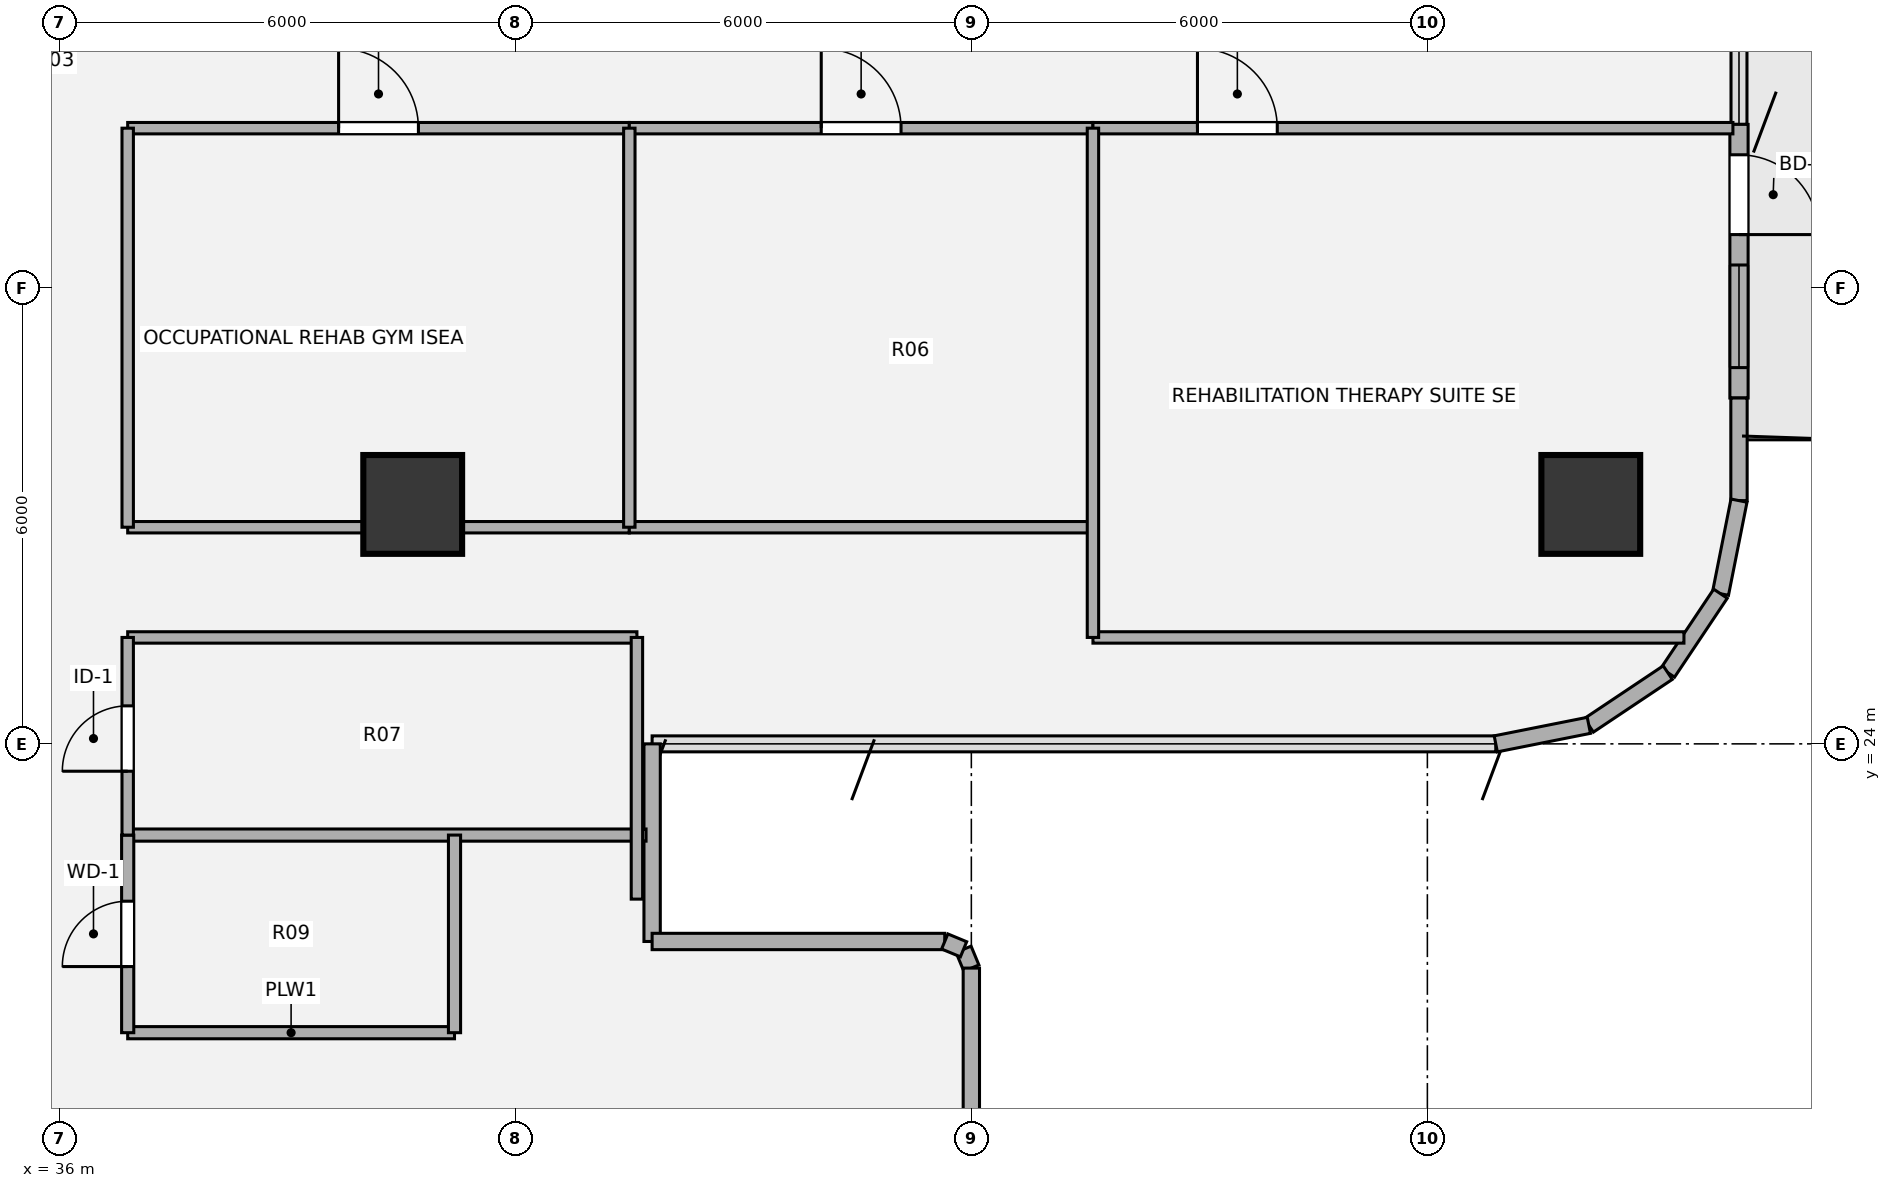
"""IFC4 building model, lengths in metres.
Left out: names, types, materials, properties, quantities, classifications, styles, units other than length and angle.
Written with IfcOpenShell. Run it as: python <this file> out.ifc"""

import sys

from ifc_helpers import new_model, si_unit, direction, frame, frame_2d, origin, origin_2d, place, context, subcontext, project, spatial, rectangle, hollow_circle, extrude, source, transform, mapped, element, fill, save


model = new_model("IFC4")
c1 = context("Model", 3, precision=1e-05, world=origin(), true_north=direction((0.0, 1.0)))
c2 = subcontext(c1, "Body", "Model", "MODEL_VIEW")
j1 = project(units=[si_unit("LENGTHUNIT", "METRE"), si_unit("PLANEANGLEUNIT", "RADIAN")], contexts=[c1])
p1 = place(None, origin())
s1 = spatial("IfcSite", under=j1, at=p1, CompositionType="ELEMENT")
p2 = place(p1, origin())
s2 = spatial("IfcBuilding", under=s1, at=p2, CompositionType="ELEMENT")
p3 = place(p2, frame((0.0, 0.0, 112.5)))
s3 = spatial("IfcBuildingStorey", under=s2, at=p3, CompositionType="ELEMENT", Elevation=112.5)
m1 = source(origin(), c2, "Body", "SweptSolid", [
    extrude(hollow_circle(Radius=0.65, WallThickness=0.045, at=origin_2d()), origin(), (0.0, 0.0, 1.0), 3.78),
])
for number, where, z_axis, x_axis in (
    (1, (56.15, 27.15, 0.0), (0.0, 0.0, 1.0), (1.0, 0.0, 0.0)),
    (2, (40.65, 27.15, 0.0), (0.0, 0.0, 1.0), (1.0, 0.0, 0.0)),
):
    element("IfcColumn", number, at=place(p3, frame(where, z_axis=z_axis, x_axis=x_axis)), inside=s3, PredefinedType="COLUMN", context=c2, shape_type="MappedRepresentation", body=[
        mapped(m1, transform((0.0, 0.0, 0.0), x_axis=(1.0, 0.0, 0.0), y_axis=(0.0, 1.0, 0.0), z_axis=(0.0, 0.0, 1.0), scale=1.0)),
    ])
p4 = place(p3, frame((47.897, 21.298, 0.0), z_axis=(0.0, 0.0, 1.0), x_axis=(0.382673670509, -0.923883575944, 0.0)))
e3 = element("IfcWall", 3, at=p4, inside=s3, PredefinedType="SOLIDWALL", context=c2, shape_type="SweptSolid", body=[
    extrude(rectangle(XDim=0.268, YDim=0.215, at=frame_2d((0.134, 0.0))), origin(), (0.0, 0.0, 1.0), 3.53),
])
p5 = place(p3, frame((48.0, 21.05, 0.0), z_axis=(0.0, 0.0, 1.0), x_axis=(0.0, -1.0, 0.0)))
e4 = element("IfcWall", 4, at=p5, inside=s3, PredefinedType="SOLIDWALL", context=c2, shape_type="SweptSolid", body=[
    extrude(rectangle(XDim=2.62, YDim=0.215, at=frame_2d((1.31, 0.0))), origin(), (0.0, 0.0, 1.0), 3.53),
])
p6 = place(p3, frame((58.1, 32.15, 0.0), z_axis=(0.0, 0.0, 1.0), x_axis=(0.0, -1.0, 0.0)))
e5 = element("IfcWall", 5, at=p6, inside=s3, PredefinedType="SOLIDWALL", context=c2, shape_type="SweptSolid", body=[
    extrude(rectangle(XDim=3.6, YDim=0.24, at=frame_2d((1.8, 0.0))), origin(), (0.0, 0.0, 1.0), 3.53),
])
p7 = place(p6, frame((0.4, 0.0, 0.0)))
e6 = element("IfcOpeningElement", 6, at=p7, cuts=e5, PredefinedType="OPENING", context=c2, shape_type="SweptSolid", body=[
    extrude(rectangle(XDim=1.05, YDim=2.15, at=origin_2d()), frame((0.525, 0.13, 1.075), z_axis=(0.0, -1.0, 0.0), x_axis=(1.0, 0.0, 0.0)), (0.0, 0.0, 1.0), 0.26),
])
p8 = place(p6, frame((1.85, 0.0, 0.85)))
e7 = element("IfcOpeningElement", 7, at=p8, cuts=e5, PredefinedType="OPENING", context=c2, shape_type="SweptSolid", body=[
    extrude(rectangle(XDim=1.35, YDim=1.35, at=origin_2d()), frame((0.675, 0.13, 0.675), z_axis=(0.0, -1.0, 0.0), x_axis=(1.0, 0.0, 0.0)), (0.0, 0.0, 1.0), 0.26),
])
p9 = place(p3, frame((58.1, 28.55, 0.0), z_axis=(0.0, 0.0, 1.0), x_axis=(0.0, -1.0, 0.0)))
e8 = element("IfcWall", 8, at=p9, inside=s3, PredefinedType="SOLIDWALL", context=c2, shape_type="SweptSolid", body=[
    extrude(rectangle(XDim=1.35, YDim=0.215, at=frame_2d((0.675, 0.0))), origin(), (0.0, 0.0, 1.0), 3.53),
])
for number, where, z_axis, x_axis in (
    (9, (58.1, 27.2, 0.0), (0.0, 0.0, 1.0), (-0.195, -0.981, 0.0)),
    (10, (57.856, 25.975, 0.0), (0.0, 0.0, 1.0), (-0.556, -0.831, 0.0)),
    (11, (57.163, 24.937, 0.0), (0.0, 0.0, 1.0), (-0.831, -0.556, 0.0)),
    (12, (56.125, 24.244, 0.0), (0.0, 0.0, 1.0), (-0.981, -0.195, 0.0)),
):
    element("IfcWall", number, at=place(p3, frame(where, z_axis=z_axis, x_axis=x_axis)), inside=s3, PredefinedType="SOLIDWALL", context=c2, shape_type="SweptSolid", body=[
        extrude(rectangle(XDim=1.249, YDim=0.215, at=frame_2d((0.624, 0.0))), origin(), (0.0, 0.0, 1.0), 3.53),
    ])
p10 = place(p3, frame((43.8, 24.0, 0.0), z_axis=(0.0, 0.0, 1.0), x_axis=(0.0, -1.0, 0.0)))
e13 = element("IfcWall", 13, at=p10, inside=s3, PredefinedType="SOLIDWALL", context=c2, shape_type="SweptSolid", body=[
    extrude(rectangle(XDim=2.6, YDim=0.215, at=frame_2d((1.3, 0.0))), origin(), (0.0, 0.0, 1.0), 3.53),
])
p11 = place(p3, frame((43.8, 21.4, 0.0), z_axis=(0.0, 0.0, 1.0), x_axis=(1.0, 0.0, 0.0)))
e14 = element("IfcWall", 14, at=p11, inside=s3, PredefinedType="SOLIDWALL", context=c2, shape_type="SweptSolid", body=[
    extrude(rectangle(XDim=3.85, YDim=0.215, at=frame_2d((1.925, 0.0))), origin(), (0.0, 0.0, 1.0), 3.53),
])
p12 = place(p3, frame((47.65, 21.4, 0.0), z_axis=(0.0, 0.0, 1.0), x_axis=(0.924205486139, -0.381895560841, 0.0)))
e15 = element("IfcWall", 15, at=p12, inside=s3, PredefinedType="SOLIDWALL", context=c2, shape_type="SweptSolid", body=[
    extrude(rectangle(XDim=0.268, YDim=0.215, at=frame_2d((0.134, 0.0))), origin(), (0.0, 0.0, 1.0), 3.53),
])
p13 = place(p3, frame((36.9, 20.2, 0.0), z_axis=(0.0, 0.0, 1.0), x_axis=(1.0, 0.0, 0.0)))
e16 = element("IfcWall", 16, at=p13, inside=s3, PredefinedType="PLUMBINGWALL", context=c2, shape_type="SweptSolid", body=[
    extrude(rectangle(XDim=4.3, YDim=0.16, at=frame_2d((2.15, 0.0))), origin(), (0.0, 0.0, 1.0), 3.5),
])
p14 = place(p3, frame((36.9, 22.8, 0.0), z_axis=(0.0, 0.0, 1.0), x_axis=(1.0, 0.0, 0.0)))
e17 = element("IfcWall", 17, at=p14, inside=s3, PredefinedType="PLUMBINGWALL", context=c2, shape_type="SweptSolid", body=[
    extrude(rectangle(XDim=6.82, YDim=0.16, at=frame_2d((3.41, 0.0))), origin(), (0.0, 0.0, 1.0), 3.5),
])
p15 = place(p3, frame((36.9, 25.4, 0.0), z_axis=(0.0, 0.0, 1.0), x_axis=(1.0, 0.0, 0.0)))
e18 = element("IfcWall", 18, at=p15, inside=s3, PredefinedType="PARTITIONING", context=c2, shape_type="SweptSolid", body=[
    extrude(rectangle(XDim=6.7, YDim=0.15, at=frame_2d((3.35, 0.0))), origin(), (0.0, 0.0, 1.0), 3.5),
])
p16 = place(p3, frame((49.6, 25.4, 0.0), z_axis=(0.0, 0.0, 1.0), x_axis=(1.0, 0.0, 0.0)))
e19 = element("IfcWall", 19, at=p16, inside=s3, PredefinedType="PARTITIONING", context=c2, shape_type="SweptSolid", body=[
    extrude(rectangle(XDim=7.776, YDim=0.15, at=frame_2d((3.888, 0.0))), origin(), (0.0, 0.0, 1.0), 3.5),
])
p17 = place(p3, frame((36.9, 26.85, 0.0), z_axis=(0.0, 0.0, 1.0), x_axis=(1.0, 0.0, 0.0)))
e20 = element("IfcWall", 20, at=p17, inside=s3, PredefinedType="PARTITIONING", context=c2, shape_type="SweptSolid", body=[
    extrude(rectangle(XDim=6.6, YDim=0.15, at=frame_2d((3.3, 0.0))), origin(), (0.0, 0.0, 1.0), 2.903),
])
p18 = place(p3, frame((43.5, 26.85, 0.0), z_axis=(0.0, 0.0, 1.0), x_axis=(1.0, 0.0, 0.0)))
e21 = element("IfcWall", 21, at=p18, inside=s3, PredefinedType="PARTITIONING", context=c2, shape_type="SweptSolid", body=[
    extrude(rectangle(XDim=6.1, YDim=0.15, at=frame_2d((3.05, 0.0))), origin(), (0.0, 0.0, 1.0), 3.055),
])
p19 = place(p3, frame((36.9, 32.1, 0.0), z_axis=(0.0, 0.0, 1.0), x_axis=(1.0, 0.0, 0.0)))
e22 = element("IfcWall", 22, at=p19, inside=s3, PredefinedType="PARTITIONING", context=c2, shape_type="SweptSolid", body=[
    extrude(rectangle(XDim=6.6, YDim=0.15, at=frame_2d((3.3, 0.0))), origin(), (0.0, 0.0, 1.0), 2.982),
])
p20 = place(p19, frame((2.775, 0.0, 0.0)))
e23 = element("IfcOpeningElement", 23, at=p20, cuts=e22, PredefinedType="OPENING", context=c2, shape_type="SweptSolid", body=[
    extrude(rectangle(XDim=1.05, YDim=2.1, at=origin_2d()), frame((0.525, 0.085, 1.05), z_axis=(0.0, -1.0, 0.0), x_axis=(1.0, 0.0, 0.0)), (0.0, 0.0, 1.0), 0.17),
])
p21 = place(p3, frame((43.5, 32.1, 0.0), z_axis=(0.0, 0.0, 1.0), x_axis=(1.0, 0.0, 0.0)))
e24 = element("IfcWall", 24, at=p21, inside=s3, PredefinedType="PARTITIONING", context=c2, shape_type="SweptSolid", body=[
    extrude(rectangle(XDim=6.1, YDim=0.15, at=frame_2d((3.05, 0.0))), origin(), (0.0, 0.0, 1.0), 2.982),
])
p22 = place(p21, frame((2.525, 0.0, 0.0)))
e25 = element("IfcOpeningElement", 25, at=p22, cuts=e24, PredefinedType="OPENING", context=c2, shape_type="SweptSolid", body=[
    extrude(rectangle(XDim=1.05, YDim=2.1, at=origin_2d()), frame((0.525, 0.085, 1.05), z_axis=(0.0, -1.0, 0.0), x_axis=(1.0, 0.0, 0.0)), (0.0, 0.0, 1.0), 0.17),
])
p23 = place(p3, frame((49.6, 32.1, 0.0), z_axis=(0.0, 0.0, 1.0), x_axis=(1.0, 0.0, 0.0)))
e26 = element("IfcWall", 26, at=p23, inside=s3, PredefinedType="PARTITIONING", context=c2, shape_type="SweptSolid", body=[
    extrude(rectangle(XDim=8.42, YDim=0.15, at=frame_2d((4.21, 0.0))), origin(), (0.0, 0.0, 1.0), 2.982),
])
p24 = place(p23, frame((1.375, 0.0, 0.0)))
e27 = element("IfcOpeningElement", 27, at=p24, cuts=e26, PredefinedType="OPENING", context=c2, shape_type="SweptSolid", body=[
    extrude(rectangle(XDim=1.05, YDim=2.1, at=origin_2d()), frame((0.525, 0.085, 1.05), z_axis=(0.0, -1.0, 0.0), x_axis=(1.0, 0.0, 0.0)), (0.0, 0.0, 1.0), 0.17),
])
p25 = place(p3, frame((36.9, 20.2, 0.0), z_axis=(0.0, 0.0, 1.0), x_axis=(0.0, 1.0, 0.0)))
e28 = element("IfcWall", 28, at=p25, inside=s3, PredefinedType="PLUMBINGWALL", context=c2, shape_type="SweptSolid", body=[
    extrude(rectangle(XDim=2.6, YDim=0.16, at=frame_2d((1.3, 0.0))), origin(), (0.0, 0.0, 1.0), 3.5),
])
p26 = place(p25, frame((0.87, 0.0, 0.0)))
e29 = element("IfcOpeningElement", 29, at=p26, cuts=e28, PredefinedType="OPENING", context=c2, shape_type="SweptSolid", body=[
    extrude(rectangle(XDim=0.86, YDim=2.1, at=origin_2d()), frame((0.43, 0.09, 1.05), z_axis=(0.0, -1.0, 0.0), x_axis=(1.0, 0.0, 0.0)), (0.0, 0.0, 1.0), 0.18),
])
p27 = place(p3, frame((36.9, 22.8, 0.0), z_axis=(0.0, 0.0, 1.0), x_axis=(0.0, 1.0, 0.0)))
e30 = element("IfcWall", 30, at=p27, inside=s3, PredefinedType="PARTITIONING", context=c2, shape_type="SweptSolid", body=[
    extrude(rectangle(XDim=2.6, YDim=0.15, at=frame_2d((1.3, 0.0))), origin(), (0.0, 0.0, 1.0), 3.5),
])
p28 = place(p27, frame((0.84, 0.0, 0.0)))
e31 = element("IfcOpeningElement", 31, at=p28, cuts=e30, PredefinedType="OPENING", context=c2, shape_type="SweptSolid", body=[
    extrude(rectangle(XDim=0.86, YDim=2.1, at=origin_2d()), frame((0.43, 0.085, 1.05), z_axis=(0.0, -1.0, 0.0), x_axis=(1.0, 0.0, 0.0)), (0.0, 0.0, 1.0), 0.17),
])
p29 = place(p3, frame((36.9, 26.85, 0.0), z_axis=(0.0, 0.0, 1.0), x_axis=(0.0, 1.0, 0.0)))
e32 = element("IfcWall", 32, at=p29, inside=s3, PredefinedType="PARTITIONING", context=c2, shape_type="SweptSolid", body=[
    extrude(rectangle(XDim=5.25, YDim=0.15, at=frame_2d((2.625, 0.0))), origin(), (0.0, 0.0, 1.0), 3.5),
])
p30 = place(p3, frame((41.2, 20.2, 0.0), z_axis=(0.0, 0.0, 1.0), x_axis=(0.0, 1.0, 0.0)))
e33 = element("IfcWall", 33, at=p30, inside=s3, PredefinedType="PLUMBINGWALL", context=c2, shape_type="SweptSolid", body=[
    extrude(rectangle(XDim=2.6, YDim=0.16, at=frame_2d((1.3, 0.0))), origin(), (0.0, 0.0, 1.0), 2.815),
])
p31 = place(p3, frame((43.5, 26.85, 0.0), z_axis=(0.0, 0.0, 1.0), x_axis=(0.0, 1.0, 0.0)))
e34 = element("IfcWall", 34, at=p31, inside=s3, PredefinedType="PARTITIONING", context=c2, shape_type="SweptSolid", body=[
    extrude(rectangle(XDim=5.25, YDim=0.15, at=frame_2d((2.625, 0.0))), origin(), (0.0, 0.0, 1.0), 3.5),
])
p32 = place(p3, frame((43.6, 21.958, 0.0), z_axis=(0.0, 0.0, 1.0), x_axis=(0.0, 1.0, 0.0)))
e35 = element("IfcWall", 35, at=p32, inside=s3, PredefinedType="PARTITIONING", context=c2, shape_type="SweptSolid", body=[
    extrude(rectangle(XDim=3.442, YDim=0.15, at=frame_2d((1.721, 0.0))), origin(), (0.0, 0.0, 1.0), 3.5),
])
p33 = place(p3, frame((49.6, 25.4, 0.0), z_axis=(0.0, 0.0, 1.0), x_axis=(0.0, 1.0, 0.0)))
e36 = element("IfcWall", 36, at=p33, inside=s3, PredefinedType="PARTITIONING", context=c2, shape_type="SweptSolid", body=[
    extrude(rectangle(XDim=6.7, YDim=0.15, at=frame_2d((3.35, 0.0))), origin(), (0.0, 0.0, 1.0), 3.5),
])
m2 = source(origin(), c2, "Body", "SweptSolid", [
    extrude(rectangle(XDim=1.05, YDim=2.15, at=origin_2d()), frame((0.525, 0.025, 1.075), z_axis=(0.0, -1.0, 0.0), x_axis=(1.0, 0.0, 0.0)), (0.0, 0.0, 1.0), 0.05),
])
p34 = place(p7, origin())
e37 = element("IfcDoor", 37, at=p34, inside=s3, OperationType="SINGLE_SWING_RIGHT", PredefinedType="DOOR", context=c2, shape_type="MappedRepresentation", body=[
    mapped(m2, transform((0.0, 0.0, 0.0), x_axis=(1.0, 0.0, 0.0), y_axis=(0.0, 1.0, 0.0), z_axis=(0.0, 0.0, 1.0), scale=1.0)),
])
fill(e6, e37)
m3 = source(origin(), c2, "Body", "SweptSolid", [
    extrude(rectangle(XDim=1.35, YDim=1.35, at=origin_2d()), frame((0.675, 0.03, 0.675), z_axis=(0.0, -1.0, 0.0), x_axis=(1.0, 0.0, 0.0)), (0.0, 0.0, 1.0), 0.06),
])
p35 = place(p8, origin())
e38 = element("IfcWindow", 38, at=p35, inside=s3, PartitioningType="SINGLE_PANEL", PredefinedType="WINDOW", context=c2, shape_type="MappedRepresentation", body=[
    mapped(m3, transform((0.0, 0.0, 0.0), x_axis=(1.0, 0.0, 0.0), y_axis=(0.0, 1.0, 0.0), z_axis=(0.0, 0.0, 1.0), scale=1.0)),
])
fill(e7, e38)
m4 = source(origin(), c2, "Body", "SweptSolid", [
    extrude(rectangle(XDim=1.05, YDim=2.1, at=origin_2d()), frame((0.525, 0.025, 1.05), z_axis=(0.0, -1.0, 0.0), x_axis=(1.0, 0.0, 0.0)), (0.0, 0.0, 1.0), 0.05),
])
p36 = place(p20, origin())
e39 = element("IfcDoor", 39, at=p36, inside=s3, OperationType="SINGLE_SWING_LEFT", PredefinedType="DOOR", context=c2, shape_type="MappedRepresentation", body=[
    mapped(m4, transform((0.0, 0.0, 0.0), x_axis=(1.0, 0.0, 0.0), y_axis=(0.0, 1.0, 0.0), z_axis=(0.0, 0.0, 1.0), scale=1.0)),
])
fill(e23, e39)
p37 = place(p22, origin())
e40 = element("IfcDoor", 40, at=p37, inside=s3, OperationType="SINGLE_SWING_LEFT", PredefinedType="DOOR", context=c2, shape_type="MappedRepresentation", body=[
    mapped(m4, transform((0.0, 0.0, 0.0), x_axis=(1.0, 0.0, 0.0), y_axis=(0.0, 1.0, 0.0), z_axis=(0.0, 0.0, 1.0), scale=1.0)),
])
fill(e25, e40)
p38 = place(p24, origin())
e41 = element("IfcDoor", 41, at=p38, inside=s3, OperationType="SINGLE_SWING_LEFT", PredefinedType="DOOR", context=c2, shape_type="MappedRepresentation", body=[
    mapped(m4, transform((0.0, 0.0, 0.0), x_axis=(1.0, 0.0, 0.0), y_axis=(0.0, 1.0, 0.0), z_axis=(0.0, 0.0, 1.0), scale=1.0)),
])
fill(e27, e41)
m5 = source(origin(), c2, "Body", "SweptSolid", [
    extrude(rectangle(XDim=0.86, YDim=2.1, at=origin_2d()), frame((0.43, 0.025, 1.05), z_axis=(0.0, -1.0, 0.0), x_axis=(1.0, 0.0, 0.0)), (0.0, 0.0, 1.0), 0.05),
])
p39 = place(p26, origin())
e42 = element("IfcDoor", 42, at=p39, inside=s3, OperationType="SINGLE_SWING_LEFT", PredefinedType="DOOR", context=c2, shape_type="MappedRepresentation", body=[
    mapped(m5, transform((0.0, 0.0, 0.0), x_axis=(1.0, 0.0, 0.0), y_axis=(0.0, 1.0, 0.0), z_axis=(0.0, 0.0, 1.0), scale=1.0)),
])
fill(e29, e42)
m6 = source(origin(), c2, "Body", "SweptSolid", [
    extrude(rectangle(XDim=0.86, YDim=2.1, at=origin_2d()), frame((0.43, 0.025, 1.05), z_axis=(0.0, -1.0, 0.0), x_axis=(1.0, 0.0, 0.0)), (0.0, 0.0, 1.0), 0.05),
])
p40 = place(p28, origin())
e43 = element("IfcDoor", 43, at=p40, inside=s3, OperationType="SINGLE_SWING_LEFT", PredefinedType="DOOR", context=c2, shape_type="MappedRepresentation", body=[
    mapped(m6, transform((0.0, 0.0, 0.0), x_axis=(1.0, 0.0, 0.0), y_axis=(0.0, 1.0, 0.0), z_axis=(0.0, 0.0, 1.0), scale=1.0)),
])
fill(e31, e43)
save(model, sys.argv[1])
